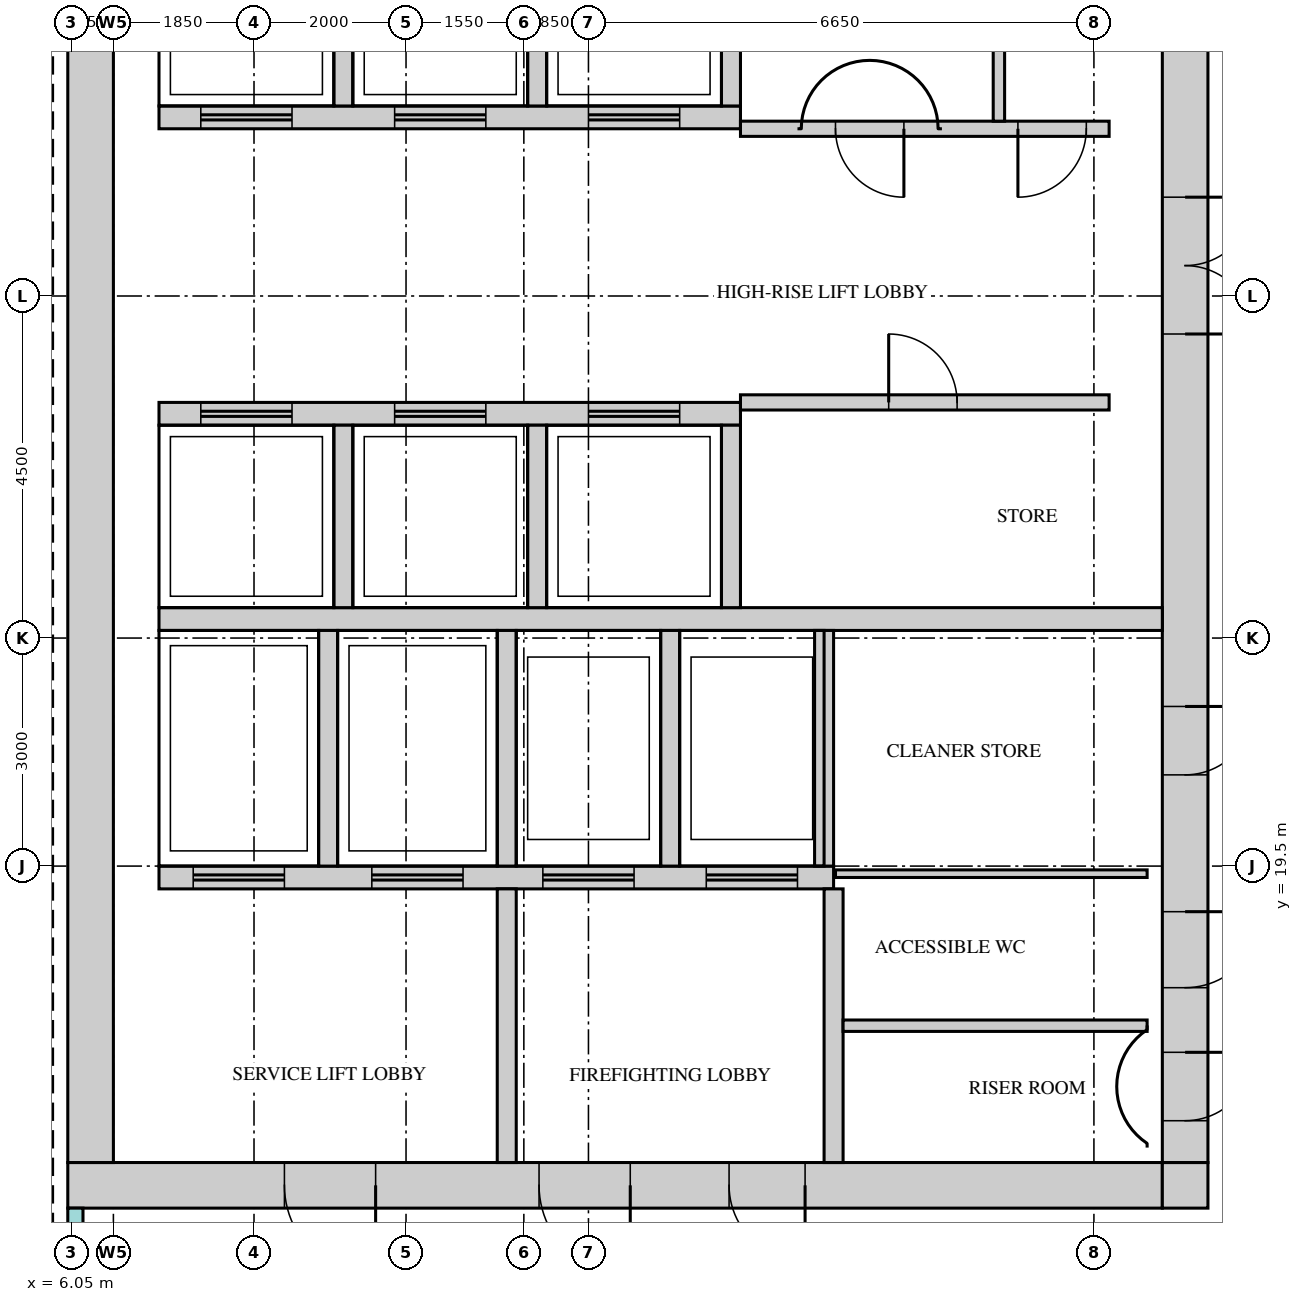
"""IFC4 building model, lengths in metres.
Left out: names, types, materials, properties, quantities, classifications, styles, units other than length and angle.
Written with IfcOpenShell. Run it as: python <this file> out.ifc"""

import sys

from ifc_helpers import new_model, si_unit, direction, frame, frame_2d, origin, place, context, subcontext, project, spatial, rectangle, extrude, source, transform, mapped, element, fill, save


model = new_model("IFC4")
c1 = context("Model", 3, precision=1e-05, world=origin(), true_north=direction((0.0, 1.0)))
c2 = subcontext(c1, "Body", "Model", "MODEL_VIEW")
j1 = project(units=[si_unit("LENGTHUNIT", "METRE"), si_unit("PLANEANGLEUNIT", "RADIAN")], contexts=[c1])
p1 = place(None, origin())
s1 = spatial("IfcSite", under=j1, at=p1, CompositionType="ELEMENT")
p2 = place(p1, origin())
s2 = spatial("IfcBuilding", under=s1, at=p2, CompositionType="ELEMENT")
p3 = place(p2, frame((0.0, 0.0, 290.2)))
s3 = spatial("IfcBuildingStorey", under=s2, at=p3, CompositionType="ELEMENT", Elevation=290.2)
m1 = source(origin(), c2, "Body", "SweptSolid", [
    extrude(rectangle(XDim=14.4, YDim=0.6, at=frame_2d((7.2, 0.0))), origin(), (0.0, 0.0, 1.0), 3.75),
])
p4 = place(p3, frame((6.0, 15.3, 0.0), z_axis=(0.0, 0.0, 1.0), x_axis=(1.0, 0.0, 0.0)))
e1 = element("IfcWall", 1, at=p4, inside=s3, PredefinedType="SHEAR", context=c2, shape_type="MappedRepresentation", body=[
    mapped(m1, transform((0.0, 0.0, 0.0))),
])
m2 = source(origin(), c2, "Body", "SweptSolid", [
    extrude(rectangle(XDim=1.2, YDim=2.1, at=frame_2d((0.6, 1.05))), frame((0.0, 0.31, 0.0), z_axis=(0.0, -1.0, 0.0), x_axis=(1.0, 0.0, 0.0)), (0.0, 0.0, 1.0), 0.62),
])
p5 = place(p4, frame((6.2, 0.0, 0.0)))
e2 = element("IfcOpeningElement", 2, at=p5, cuts=e1, PredefinedType="OPENING", context=c2, shape_type="MappedRepresentation", body=[
    mapped(m2, transform((0.0, 0.0, 0.0))),
])
p6 = place(p4, frame((2.85, 0.0, 0.0)))
e3 = element("IfcOpeningElement", 3, at=p6, cuts=e1, PredefinedType="OPENING", context=c2, shape_type="MappedRepresentation", body=[
    mapped(m2, transform((0.0, 0.0, 0.0))),
])
m3 = source(origin(), c2, "Body", "SweptSolid", [
    extrude(rectangle(XDim=1.0, YDim=2.1, at=frame_2d((0.5, 1.05))), frame((0.0, 0.31, 0.0), z_axis=(0.0, -1.0, 0.0), x_axis=(1.0, 0.0, 0.0)), (0.0, 0.0, 1.0), 0.62),
])
p7 = place(p4, frame((8.7, 0.0, 0.0)))
e4 = element("IfcOpeningElement", 4, at=p7, cuts=e1, PredefinedType="OPENING", context=c2, shape_type="MappedRepresentation", body=[
    mapped(m3, transform((0.0, 0.0, 0.0))),
])
m4 = source(origin(), c2, "Body", "SweptSolid", [
    extrude(rectangle(XDim=0.6, YDim=0.6, at=frame_2d((0.3, 0.0))), origin(), (0.0, 0.0, 1.0), 3.75),
])
p8 = place(p3, frame((20.4, 15.3, 0.0), z_axis=(0.0, 0.0, 1.0), x_axis=(1.0, 0.0, 0.0)))
e5 = element("IfcWall", 5, at=p8, inside=s3, PredefinedType="SHEAR", context=c2, shape_type="MappedRepresentation", body=[
    mapped(m4, transform((0.0, 0.0, 0.0))),
])
m5 = source(origin(), c2, "Body", "SweptSolid", [
    extrude(rectangle(XDim=22.8, YDim=0.6, at=frame_2d((11.4, 0.0))), origin(), (0.0, 0.0, 1.0), 3.75),
])
p9 = place(p3, frame((20.7, 15.6, 0.0), z_axis=(0.0, 0.0, 1.0), x_axis=(0.0, 1.0, 0.0)))
e6 = element("IfcWall", 6, at=p9, inside=s3, PredefinedType="SHEAR", context=c2, shape_type="MappedRepresentation", body=[
    mapped(m5, transform((0.0, 0.0, 0.0))),
])
m6 = source(origin(), c2, "Body", "SweptSolid", [
    extrude(rectangle(XDim=1.8, YDim=2.1, at=frame_2d((0.9, 1.05))), frame((0.0, 0.31, 0.0), z_axis=(0.0, -1.0, 0.0), x_axis=(1.0, 0.0, 0.0)), (0.0, 0.0, 1.0), 0.62),
])
p10 = place(p9, frame((10.9, 0.0, 0.0)))
e7 = element("IfcOpeningElement", 7, at=p10, cuts=e6, PredefinedType="OPENING", context=c2, shape_type="MappedRepresentation", body=[
    mapped(m6, transform((0.0, 0.0, 0.0))),
])
m7 = source(origin(), c2, "Body", "SweptSolid", [
    extrude(rectangle(XDim=0.9, YDim=2.1, at=frame_2d((0.45, 1.05))), frame((0.0, 0.31, 0.0), z_axis=(0.0, -1.0, 0.0), x_axis=(1.0, 0.0, 0.0)), (0.0, 0.0, 1.0), 0.62),
])
p11 = place(p9, frame((0.55, 0.0, 0.0)))
e8 = element("IfcOpeningElement", 8, at=p11, cuts=e6, PredefinedType="OPENING", context=c2, shape_type="MappedRepresentation", body=[
    mapped(m7, transform((0.0, 0.0, 0.0))),
])
p12 = place(p9, frame((2.3, 0.0, 0.0)))
e9 = element("IfcOpeningElement", 9, at=p12, cuts=e6, PredefinedType="OPENING", context=c2, shape_type="MappedRepresentation", body=[
    mapped(m3, transform((0.0, 0.0, 0.0))),
])
p13 = place(p9, frame((5.1, 0.0, 0.0)))
e10 = element("IfcOpeningElement", 10, at=p13, cuts=e6, PredefinedType="OPENING", context=c2, shape_type="MappedRepresentation", body=[
    mapped(m7, transform((0.0, 0.0, 0.0))),
])
p14 = place(p3, frame((6.3, 15.6, 0.0), z_axis=(0.0, 0.0, 1.0), x_axis=(0.0, 1.0, 0.0)))
e11 = element("IfcWall", 11, at=p14, inside=s3, PredefinedType="SHEAR", context=c2, shape_type="MappedRepresentation", body=[
    mapped(m5, transform((0.0, 0.0, 0.0))),
])
m8 = source(origin(), c2, "Body", "SweptSolid", [
    extrude(rectangle(XDim=13.2, YDim=0.3, at=frame_2d((6.6, 0.0))), origin(), (0.0, 0.0, 1.0), 3.75),
])
p15 = place(p3, frame((7.2, 22.75, 0.0), z_axis=(0.0, 0.0, 1.0), x_axis=(1.0, 0.0, 0.0)))
e12 = element("IfcWall", 12, at=p15, inside=s3, PredefinedType="STANDARD", context=c2, shape_type="MappedRepresentation", body=[
    mapped(m8, transform((0.0, 0.0, 0.0))),
])
m9 = source(origin(), c2, "Body", "SweptSolid", [
    extrude(rectangle(XDim=8.875, YDim=0.3, at=frame_2d((4.438, 0.0))), origin(), (0.0, 0.0, 1.0), 3.75),
])
p16 = place(p3, frame((7.2, 19.35, 0.0), z_axis=(0.0, 0.0, 1.0), x_axis=(1.0, 0.0, 0.0)))
e13 = element("IfcWall", 13, at=p16, inside=s3, PredefinedType="STANDARD", context=c2, shape_type="MappedRepresentation", body=[
    mapped(m9, transform((0.0, 0.0, 0.0))),
])
m10 = source(origin(), c2, "Body", "SweptSolid", [
    extrude(rectangle(XDim=1.2, YDim=2.1, at=frame_2d((0.6, 1.05))), frame((0.0, 0.16, 0.0), z_axis=(0.0, -1.0, 0.0), x_axis=(1.0, 0.0, 0.0)), (0.0, 0.0, 1.0), 0.32),
])
p17 = place(p16, frame((0.45, 0.0, 0.0)))
e14 = element("IfcOpeningElement", 14, at=p17, cuts=e13, PredefinedType="OPENING", context=c2, shape_type="MappedRepresentation", body=[
    mapped(m10, transform((0.0, 0.0, 0.0))),
])
p18 = place(p16, frame((2.8, 0.0, 0.0)))
e15 = element("IfcOpeningElement", 15, at=p18, cuts=e13, PredefinedType="OPENING", context=c2, shape_type="MappedRepresentation", body=[
    mapped(m10, transform((0.0, 0.0, 0.0))),
])
p19 = place(p16, frame((5.05, 0.0, 0.0)))
e16 = element("IfcOpeningElement", 16, at=p19, cuts=e13, PredefinedType="OPENING", context=c2, shape_type="MappedRepresentation", body=[
    mapped(m10, transform((0.0, 0.0, 0.0))),
])
p20 = place(p16, frame((7.2, 0.0, 0.0)))
e17 = element("IfcOpeningElement", 17, at=p20, cuts=e13, PredefinedType="OPENING", context=c2, shape_type="MappedRepresentation", body=[
    mapped(m10, transform((0.0, 0.0, 0.0))),
])
m11 = source(origin(), c2, "Body", "SweptSolid", [
    extrude(rectangle(XDim=7.65, YDim=0.3, at=frame_2d((3.825, 0.0))), origin(), (0.0, 0.0, 1.0), 3.75),
])
p21 = place(p3, frame((7.2, 29.35, 0.0), z_axis=(0.0, 0.0, 1.0), x_axis=(1.0, 0.0, 0.0)))
e18 = element("IfcWall", 18, at=p21, inside=s3, PredefinedType="STANDARD", context=c2, shape_type="MappedRepresentation", body=[
    mapped(m11, transform((0.0, 0.0, 0.0))),
])
p22 = place(p21, frame((0.55, 0.0, 0.0)))
e19 = element("IfcOpeningElement", 19, at=p22, cuts=e18, PredefinedType="OPENING", context=c2, shape_type="MappedRepresentation", body=[
    mapped(m10, transform((0.0, 0.0, 0.0))),
])
p23 = place(p21, frame((3.1, 0.0, 0.0)))
e20 = element("IfcOpeningElement", 20, at=p23, cuts=e18, PredefinedType="OPENING", context=c2, shape_type="MappedRepresentation", body=[
    mapped(m10, transform((0.0, 0.0, 0.0))),
])
p24 = place(p21, frame((5.65, 0.0, 0.0)))
e21 = element("IfcOpeningElement", 21, at=p24, cuts=e18, PredefinedType="OPENING", context=c2, shape_type="MappedRepresentation", body=[
    mapped(m10, transform((0.0, 0.0, 0.0))),
])
p25 = place(p3, frame((7.2, 25.45, 0.0), z_axis=(0.0, 0.0, 1.0), x_axis=(1.0, 0.0, 0.0)))
e22 = element("IfcWall", 22, at=p25, inside=s3, PredefinedType="STANDARD", context=c2, shape_type="MappedRepresentation", body=[
    mapped(m11, transform((0.0, 0.0, 0.0))),
])
p26 = place(p25, frame((0.55, 0.0, 0.0)))
e23 = element("IfcOpeningElement", 23, at=p26, cuts=e22, PredefinedType="OPENING", context=c2, shape_type="MappedRepresentation", body=[
    mapped(m10, transform((0.0, 0.0, 0.0))),
])
p27 = place(p25, frame((3.1, 0.0, 0.0)))
e24 = element("IfcOpeningElement", 24, at=p27, cuts=e22, PredefinedType="OPENING", context=c2, shape_type="MappedRepresentation", body=[
    mapped(m10, transform((0.0, 0.0, 0.0))),
])
p28 = place(p25, frame((5.65, 0.0, 0.0)))
e25 = element("IfcOpeningElement", 25, at=p28, cuts=e22, PredefinedType="OPENING", context=c2, shape_type="MappedRepresentation", body=[
    mapped(m10, transform((0.0, 0.0, 0.0))),
])
m12 = source(origin(), c2, "Body", "SweptSolid", [
    extrude(rectangle(XDim=3.1, YDim=0.25, at=frame_2d((1.55, 0.0))), origin(), (0.0, 0.0, 1.0), 3.75),
])
for number, where, z_axis, x_axis in (
    (26, (9.425, 19.5, 0.0), (0.0, 0.0, 1.0), (0.0, 1.0, 0.0)),
    (27, (11.775, 19.5, 0.0), (0.0, 0.0, 1.0), (0.0, 1.0, 0.0)),
    (28, (13.925, 19.5, 0.0), (0.0, 0.0, 1.0), (0.0, 1.0, 0.0)),
    (29, (15.95, 19.5, 0.0), (0.0, 0.0, 1.0), (0.0, 1.0, 0.0)),
):
    element("IfcWall", number, at=place(p3, frame(where, z_axis=z_axis, x_axis=x_axis)), inside=s3, PredefinedType="STANDARD", context=c2, shape_type="MappedRepresentation", body=[
        mapped(m12, transform((0.0, 0.0, 0.0))),
    ])
m13 = source(origin(), c2, "Body", "SweptSolid", [
    extrude(rectangle(XDim=2.4, YDim=0.25, at=frame_2d((1.2, 0.0))), origin(), (0.0, 0.0, 1.0), 3.75),
])
for number, where, z_axis, x_axis in (
    (30, (9.625, 29.5, 0.0), (0.0, 0.0, 1.0), (0.0, 1.0, 0.0)),
    (31, (12.175, 29.5, 0.0), (0.0, 0.0, 1.0), (0.0, 1.0, 0.0)),
    (32, (14.725, 29.5, 0.0), (0.0, 0.0, 1.0), (0.0, 1.0, 0.0)),
):
    element("IfcWall", number, at=place(p3, frame(where, z_axis=z_axis, x_axis=x_axis)), inside=s3, PredefinedType="STANDARD", context=c2, shape_type="MappedRepresentation", body=[
        mapped(m13, transform((0.0, 0.0, 0.0))),
    ])
m14 = source(origin(), c2, "Body", "SweptSolid", [
    extrude(rectangle(XDim=2.4, YDim=0.25, at=frame_2d((1.2, 0.0))), origin(), (0.0, 0.0, 1.0), 3.75),
])
for number, where, z_axis, x_axis in (
    (33, (9.625, 22.9, 0.0), (0.0, 0.0, 1.0), (0.0, 1.0, 0.0)),
    (34, (12.175, 22.9, 0.0), (0.0, 0.0, 1.0), (0.0, 1.0, 0.0)),
    (35, (14.725, 22.9, 0.0), (0.0, 0.0, 1.0), (0.0, 1.0, 0.0)),
):
    element("IfcWall", number, at=place(p3, frame(where, z_axis=z_axis, x_axis=x_axis)), inside=s3, PredefinedType="STANDARD", context=c2, shape_type="MappedRepresentation", body=[
        mapped(m14, transform((0.0, 0.0, 0.0))),
    ])
m15 = source(origin(), c2, "Body", "SweptSolid", [
    extrude(rectangle(XDim=3.6, YDim=0.25, at=frame_2d((1.8, 0.0))), origin(), (0.0, 0.0, 1.0), 3.75),
])
for number, where, z_axis, x_axis in (
    (36, (16.075, 15.6, 0.0), (0.0, 0.0, 1.0), (0.0, 1.0, 0.0)),
    (37, (11.775, 15.6, 0.0), (0.0, 0.0, 1.0), (0.0, 1.0, 0.0)),
):
    element("IfcWall", number, at=place(p3, frame(where, z_axis=z_axis, x_axis=x_axis)), inside=s3, PredefinedType="STANDARD", context=c2, shape_type="MappedRepresentation", body=[
        mapped(m15, transform((0.0, 0.0, 0.0))),
    ])
m16 = source(origin(), c2, "Body", "SweptSolid", [
    extrude(rectangle(XDim=4.0, YDim=0.15, at=frame_2d((2.0, 0.0))), origin(), (0.0, 0.0, 1.0), 3.8),
])
p29 = place(p3, frame((16.2, 17.4, 0.0), z_axis=(0.0, 0.0, 1.0), x_axis=(1.0, 0.0, 0.0)))
e38 = element("IfcWall", 38, at=p29, inside=s3, PredefinedType="PARTITIONING", context=c2, shape_type="MappedRepresentation", body=[
    mapped(m16, transform((0.0, 0.0, 0.0))),
])
m17 = source(origin(), c2, "Body", "SweptSolid", [
    extrude(rectangle(XDim=4.1, YDim=0.1, at=frame_2d((2.05, 0.0))), origin(), (0.0, 0.0, 1.0), 3.8),
])
p30 = place(p3, frame((16.1, 19.4, 0.0), z_axis=(0.0, 0.0, 1.0), x_axis=(1.0, 0.0, 0.0)))
e39 = element("IfcWall", 39, at=p30, inside=s3, PredefinedType="PARTITIONING", context=c2, shape_type="MappedRepresentation", body=[
    mapped(m17, transform((0.0, 0.0, 0.0))),
])
m18 = source(origin(), c2, "Body", "SweptSolid", [
    extrude(rectangle(XDim=4.85, YDim=0.2, at=frame_2d((2.425, 0.0))), origin(), (0.0, 0.0, 1.0), 3.8),
])
p31 = place(p3, frame((14.85, 25.6, 0.0), z_axis=(0.0, 0.0, 1.0), x_axis=(1.0, 0.0, 0.0)))
e40 = element("IfcWall", 40, at=p31, inside=s3, PredefinedType="PARTITIONING", context=c2, shape_type="MappedRepresentation", body=[
    mapped(m18, transform((0.0, 0.0, 0.0))),
])
m19 = source(origin(), c2, "Body", "SweptSolid", [
    extrude(rectangle(XDim=0.9, YDim=2.1, at=frame_2d((0.45, 1.05))), frame((0.0, 0.11, 0.0), z_axis=(0.0, -1.0, 0.0), x_axis=(1.0, 0.0, 0.0)), (0.0, 0.0, 1.0), 0.22),
])
p32 = place(p31, frame((1.95, 0.0, 0.0)))
e41 = element("IfcOpeningElement", 41, at=p32, cuts=e40, PredefinedType="OPENING", context=c2, shape_type="MappedRepresentation", body=[
    mapped(m19, transform((0.0, 0.0, 0.0))),
])
p33 = place(p3, frame((14.85, 29.2, 0.0), z_axis=(0.0, 0.0, 1.0), x_axis=(1.0, 0.0, 0.0)))
e42 = element("IfcWall", 42, at=p33, inside=s3, PredefinedType="PARTITIONING", context=c2, shape_type="MappedRepresentation", body=[
    mapped(m18, transform((0.0, 0.0, 0.0))),
])
p34 = place(p33, frame((1.25, 0.0, 0.0)))
e43 = element("IfcOpeningElement", 43, at=p34, cuts=e42, PredefinedType="OPENING", context=c2, shape_type="MappedRepresentation", body=[
    mapped(m19, transform((0.0, 0.0, 0.0))),
])
p35 = place(p33, frame((3.65, 0.0, 0.0)))
e44 = element("IfcOpeningElement", 44, at=p35, cuts=e42, PredefinedType="OPENING", context=c2, shape_type="MappedRepresentation", body=[
    mapped(m19, transform((0.0, 0.0, 0.0))),
])
m20 = source(origin(), c2, "Body", "SweptSolid", [
    extrude(rectangle(XDim=2.8, YDim=0.15, at=frame_2d((1.4, 0.0))), origin(), (0.0, 0.0, 1.0), 3.8),
])
p36 = place(p3, frame((18.25, 29.3, 0.0), z_axis=(0.0, 0.0, 1.0), x_axis=(0.0, 1.0, 0.0)))
e45 = element("IfcWall", 45, at=p36, inside=s3, PredefinedType="PARTITIONING", context=c2, shape_type="MappedRepresentation", body=[
    mapped(m20, transform((0.0, 0.0, 0.0))),
])
m21 = source(origin(), c2, "Body", "SweptSolid", [
    extrude(rectangle(XDim=0.9, YDim=2.1, at=frame_2d((0.45, 1.05))), frame((0.0, 0.025, 0.0), z_axis=(0.0, -1.0, 0.0), x_axis=(1.0, 0.0, 0.0)), (0.0, 0.0, 1.0), 0.05),
])
p37 = place(p32, origin())
e46 = element("IfcDoor", 46, at=p37, inside=s3, OperationType="SINGLE_SWING_RIGHT", PredefinedType="DOOR", context=c2, shape_type="MappedRepresentation", body=[
    mapped(m21, transform((0.0, 0.0, 0.0))),
])
fill(e41, e46)
p38 = place(p34, origin())
e47 = element("IfcDoor", 47, at=p38, inside=s3, OperationType="SINGLE_SWING_RIGHT", PredefinedType="DOOR", context=c2, shape_type="MappedRepresentation", body=[
    mapped(m21, transform((0.0, 0.0, 0.0))),
])
fill(e43, e47)
p39 = place(p35, origin())
e48 = element("IfcDoor", 48, at=p39, inside=s3, OperationType="SINGLE_SWING_LEFT", PredefinedType="DOOR", context=c2, shape_type="MappedRepresentation", body=[
    mapped(m21, transform((0.0, 0.0, 0.0))),
])
fill(e44, e48)
m22 = source(origin(), c2, "Body", "SweptSolid", [
    extrude(rectangle(XDim=1.8, YDim=2.1, at=frame_2d((0.9, 1.05))), frame((0.0, 0.25, 0.0), z_axis=(0.0, -1.0, 0.0), x_axis=(1.0, 0.0, 0.0)), (0.0, 0.0, 1.0), 0.5),
])
p40 = place(p10, origin())
e49 = element("IfcDoor", 49, at=p40, inside=s3, OperationType="DOUBLE_DOOR_SINGLE_SWING", PredefinedType="DOOR", context=c2, shape_type="MappedRepresentation", body=[
    mapped(m22, transform((0.0, 0.0, 0.0))),
])
fill(e7, e49)
m23 = source(origin(), c2, "Body", "SweptSolid", [
    extrude(rectangle(XDim=0.9, YDim=2.1, at=frame_2d((0.45, 1.05))), frame((0.0, 0.25, 0.0), z_axis=(0.0, -1.0, 0.0), x_axis=(1.0, 0.0, 0.0)), (0.0, 0.0, 1.0), 0.5),
])
p41 = place(p11, origin())
e50 = element("IfcDoor", 50, at=p41, inside=s3, OperationType="SINGLE_SWING_RIGHT", PredefinedType="DOOR", context=c2, shape_type="MappedRepresentation", body=[
    mapped(m23, transform((0.0, 0.0, 0.0))),
])
fill(e8, e50)
m24 = source(origin(), c2, "Body", "SweptSolid", [
    extrude(rectangle(XDim=1.0, YDim=2.1, at=frame_2d((0.5, 1.05))), frame((0.0, 0.25, 0.0), z_axis=(0.0, -1.0, 0.0), x_axis=(1.0, 0.0, 0.0)), (0.0, 0.0, 1.0), 0.5),
])
p42 = place(p12, origin())
e51 = element("IfcDoor", 51, at=p42, inside=s3, OperationType="SINGLE_SWING_RIGHT", PredefinedType="DOOR", context=c2, shape_type="MappedRepresentation", body=[
    mapped(m24, transform((0.0, 0.0, 0.0))),
])
fill(e9, e51)
p43 = place(p13, origin())
e52 = element("IfcDoor", 52, at=p43, inside=s3, OperationType="SINGLE_SWING_RIGHT", PredefinedType="DOOR", context=c2, shape_type="MappedRepresentation", body=[
    mapped(m23, transform((0.0, 0.0, 0.0))),
])
fill(e10, e52)
m25 = source(origin(), c2, "Body", "SweptSolid", [
    extrude(rectangle(XDim=1.2, YDim=2.1, at=frame_2d((0.6, 1.05))), frame((0.0, 0.25, 0.0), z_axis=(0.0, -1.0, 0.0), x_axis=(1.0, 0.0, 0.0)), (0.0, 0.0, 1.0), 0.5),
])
p44 = place(p5, origin())
e53 = element("IfcDoor", 53, at=p44, inside=s3, OperationType="SINGLE_SWING_RIGHT", PredefinedType="DOOR", context=c2, shape_type="MappedRepresentation", body=[
    mapped(m25, transform((0.0, 0.0, 0.0))),
])
fill(e2, e53)
p45 = place(p6, origin())
e54 = element("IfcDoor", 54, at=p45, inside=s3, OperationType="SINGLE_SWING_RIGHT", PredefinedType="DOOR", context=c2, shape_type="MappedRepresentation", body=[
    mapped(m25, transform((0.0, 0.0, 0.0))),
])
fill(e3, e54)
p46 = place(p7, origin())
e55 = element("IfcDoor", 55, at=p46, inside=s3, OperationType="SINGLE_SWING_RIGHT", PredefinedType="DOOR", context=c2, shape_type="MappedRepresentation", body=[
    mapped(m24, transform((0.0, 0.0, 0.0))),
])
fill(e4, e55)
m26 = source(origin(), c2, "Body", "SweptSolid", [
    extrude(rectangle(XDim=1.2, YDim=2.1, at=frame_2d((0.6, 1.05))), frame((0.0, 0.025, 0.0), z_axis=(0.0, -1.0, 0.0), x_axis=(1.0, 0.0, 0.0)), (0.0, 0.0, 1.0), 0.05),
])
p47 = place(p26, origin())
e56 = element("IfcDoor", 56, at=p47, inside=s3, OperationType="DOUBLE_DOOR_SLIDING", PredefinedType="DOOR", context=c2, shape_type="MappedRepresentation", body=[
    mapped(m26, transform((0.0, 0.0, 0.0))),
])
fill(e23, e56)
p48 = place(p27, origin())
e57 = element("IfcDoor", 57, at=p48, inside=s3, OperationType="DOUBLE_DOOR_SLIDING", PredefinedType="DOOR", context=c2, shape_type="MappedRepresentation", body=[
    mapped(m26, transform((0.0, 0.0, 0.0))),
])
fill(e24, e57)
p49 = place(p28, origin())
e58 = element("IfcDoor", 58, at=p49, inside=s3, OperationType="DOUBLE_DOOR_SLIDING", PredefinedType="DOOR", context=c2, shape_type="MappedRepresentation", body=[
    mapped(m26, transform((0.0, 0.0, 0.0))),
])
fill(e25, e58)
p50 = place(p22, origin())
e59 = element("IfcDoor", 59, at=p50, inside=s3, OperationType="DOUBLE_DOOR_SLIDING", PredefinedType="DOOR", context=c2, shape_type="MappedRepresentation", body=[
    mapped(m26, transform((0.0, 0.0, 0.0))),
])
fill(e19, e59)
p51 = place(p23, origin())
e60 = element("IfcDoor", 60, at=p51, inside=s3, OperationType="DOUBLE_DOOR_SLIDING", PredefinedType="DOOR", context=c2, shape_type="MappedRepresentation", body=[
    mapped(m26, transform((0.0, 0.0, 0.0))),
])
fill(e20, e60)
p52 = place(p24, origin())
e61 = element("IfcDoor", 61, at=p52, inside=s3, OperationType="DOUBLE_DOOR_SLIDING", PredefinedType="DOOR", context=c2, shape_type="MappedRepresentation", body=[
    mapped(m26, transform((0.0, 0.0, 0.0))),
])
fill(e21, e61)
p53 = place(p17, origin())
e62 = element("IfcDoor", 62, at=p53, inside=s3, OperationType="DOUBLE_DOOR_SLIDING", PredefinedType="DOOR", context=c2, shape_type="MappedRepresentation", body=[
    mapped(m26, transform((0.0, 0.0, 0.0))),
])
fill(e14, e62)
p54 = place(p18, origin())
e63 = element("IfcDoor", 63, at=p54, inside=s3, OperationType="DOUBLE_DOOR_SLIDING", PredefinedType="DOOR", context=c2, shape_type="MappedRepresentation", body=[
    mapped(m26, transform((0.0, 0.0, 0.0))),
])
fill(e15, e63)
p55 = place(p19, origin())
e64 = element("IfcDoor", 64, at=p55, inside=s3, OperationType="DOUBLE_DOOR_SLIDING", PredefinedType="DOOR", context=c2, shape_type="MappedRepresentation", body=[
    mapped(m26, transform((0.0, 0.0, 0.0))),
])
fill(e16, e64)
p56 = place(p20, origin())
e65 = element("IfcDoor", 65, at=p56, inside=s3, OperationType="DOUBLE_DOOR_SLIDING", PredefinedType="DOOR", context=c2, shape_type="MappedRepresentation", body=[
    mapped(m26, transform((0.0, 0.0, 0.0))),
])
fill(e17, e65)
save(model, sys.argv[1])
